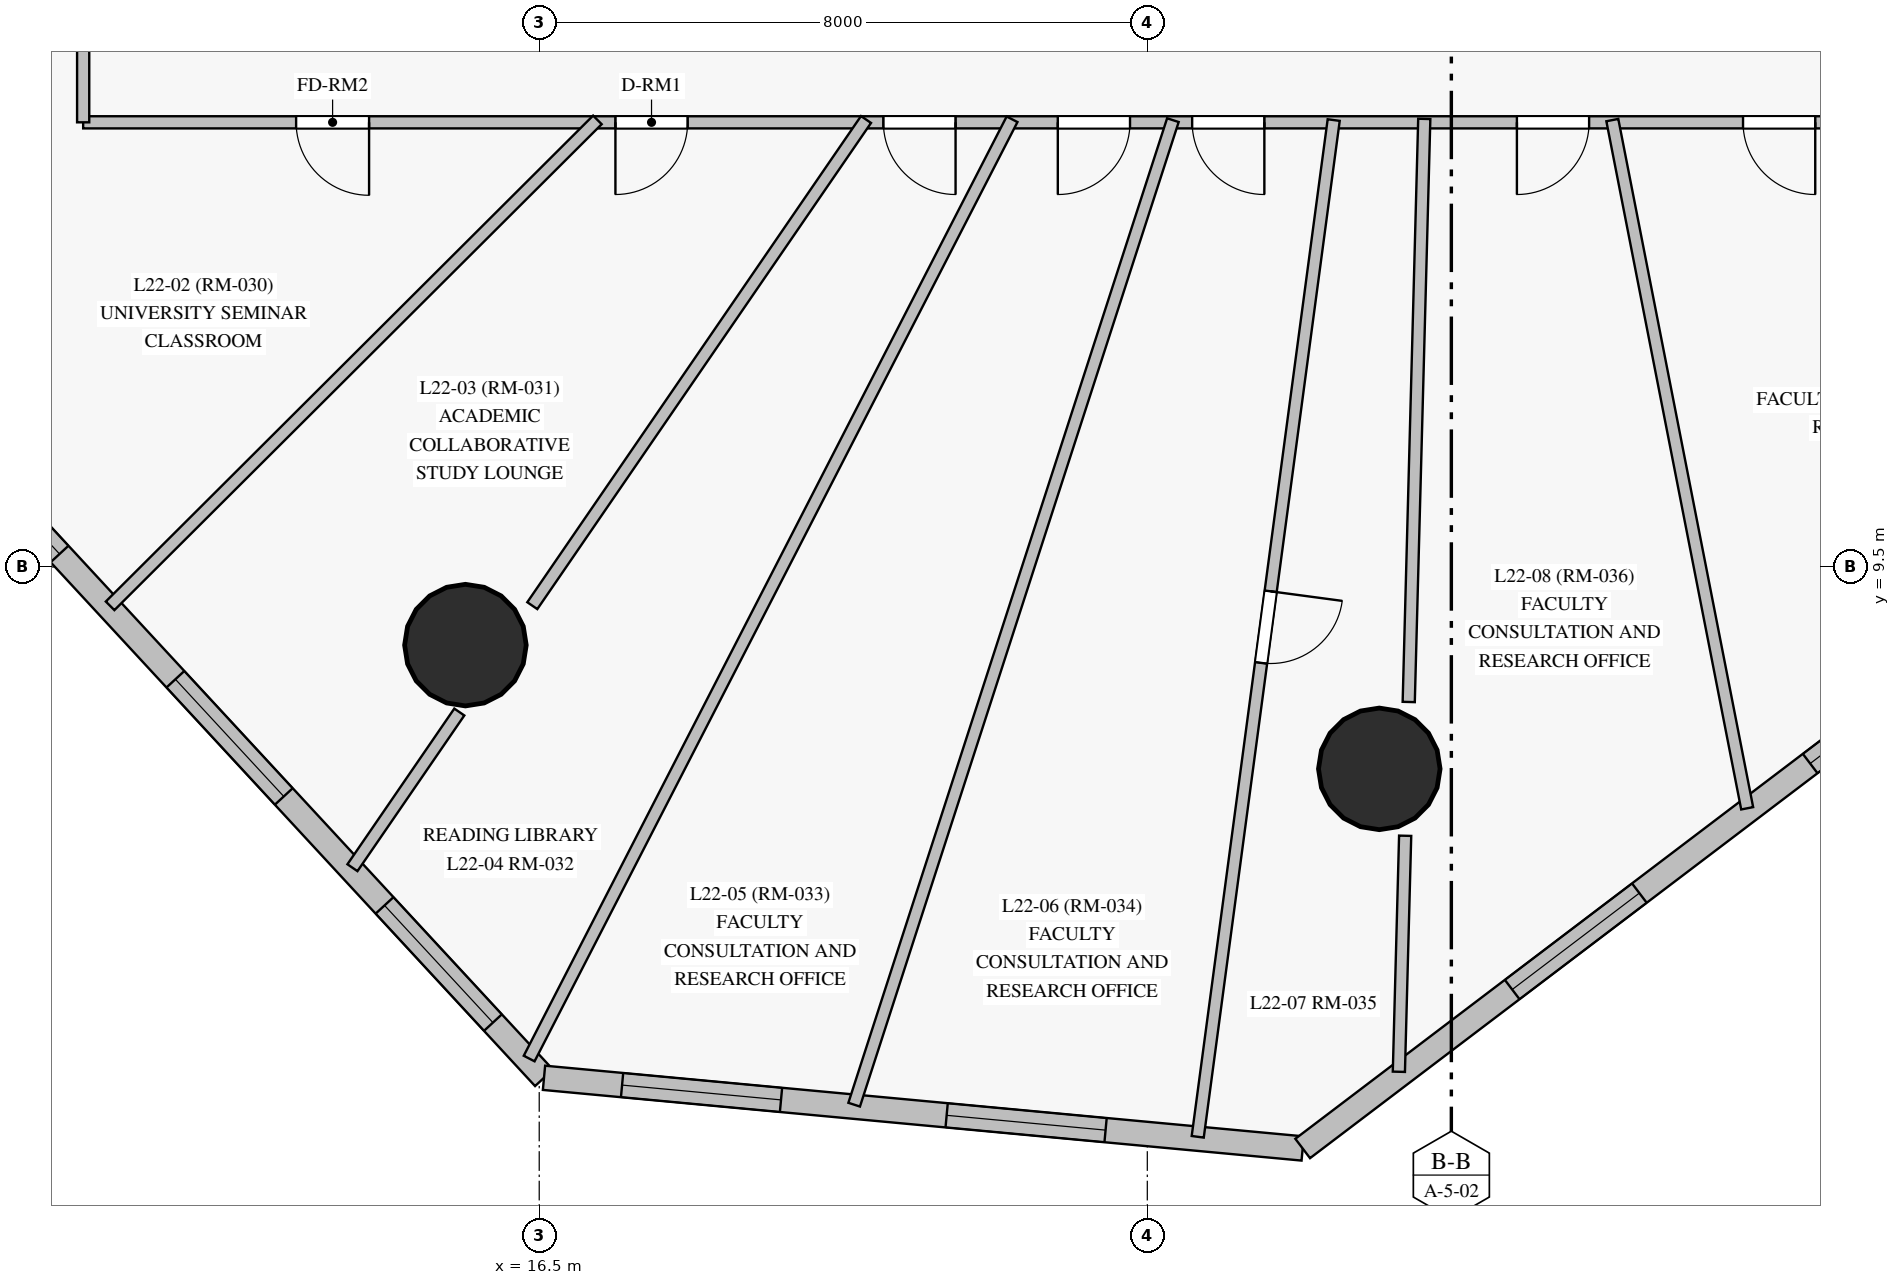
"""IFC4 building model, lengths in metres.
Left out: names, types, materials, properties, quantities, classifications, styles, units other than length and angle.
Written with IfcOpenShell. Run it as: python <this file> out.ifc"""

import sys

from ifc_helpers import new_model, si_unit, direction, frame, frame_2d, origin, origin_with_axes, origin_2d, place, context, subcontext, project, spatial, rectangle, circle, extrude, source, transform, mapped, element, fill, save


model = new_model("IFC4")
c1 = context("Model", 3, precision=1e-05, world=origin(), true_north=direction((0.0, 1.0)))
c2 = subcontext(c1, "Body", "Model", "MODEL_VIEW")
j1 = project(units=[si_unit("LENGTHUNIT", "METRE"), si_unit("PLANEANGLEUNIT", "RADIAN")], contexts=[c1])
p1 = place(None, origin())
s1 = spatial("IfcSite", under=j1, at=p1, CompositionType="ELEMENT")
p2 = place(p1, origin())
s2 = spatial("IfcBuilding", under=s1, at=p2, CompositionType="ELEMENT")
p3 = place(p2, frame((0.0, 0.0, 84.1)))
s3 = spatial("IfcBuildingStorey", under=s2, at=p3, CompositionType="ELEMENT", Elevation=84.1)
m1 = source(origin_with_axes(), c2, "Body", "SweptSolid", [
    extrude(circle(Radius=0.8, at=origin_2d()), origin(), (0.0, 0.0, 1.0), 3.6),
])
for number, where, z_axis, x_axis in (
    (1, (15.529, 8.472, 0.0), (0.0, 0.0, 1.0), (1.0, 0.0, 0.0)),
    (2, (27.552, 6.844, 0.0), (0.0, 0.0, 1.0), (1.0, 0.0, 0.0)),
):
    element("IfcColumn", number, at=place(p3, frame(where, z_axis=z_axis, x_axis=x_axis)), inside=s3, PredefinedType="COLUMN", context=c2, shape_type="MappedRepresentation", body=[
        mapped(m1, transform((0.0, 0.0, 0.0), scale=1.0)),
    ])
p4 = place(p3, frame((8.077, 11.955, 0.0), z_axis=(0.0, 0.0, 1.0), x_axis=(0.678985658744, -0.734151534235, 0.0)))
e3 = element("IfcWall", 3, at=p4, inside=s3, PredefinedType="SOLIDWALL", context=c2, shape_type="SweptSolid", body=[
    extrude(rectangle(XDim=12.498, YDim=0.32, at=frame_2d((6.249, 0.0))), origin(), (0.0, 0.0, 1.0), 3.325),
])
p5 = place(p4, frame((1.011, 0.0, 0.85)))
e4 = element("IfcOpeningElement", 4, at=p5, cuts=e3, PredefinedType="OPENING", context=c2, shape_type="SweptSolid", body=[
    extrude(rectangle(XDim=2.1, YDim=1.95, at=frame_2d((1.05, 0.975))), frame((0.0, 0.17, 0.0), z_axis=(0.0, -1.0, 0.0), x_axis=(1.0, 0.0, 0.0)), (0.0, 0.0, 1.0), 0.34),
])
p6 = place(p4, frame((5.356, 0.0, 0.85)))
e5 = element("IfcOpeningElement", 5, at=p6, cuts=e3, PredefinedType="OPENING", context=c2, shape_type="SweptSolid", body=[
    extrude(rectangle(XDim=2.1, YDim=1.95, at=frame_2d((1.05, 0.975))), frame((0.0, 0.17, 0.0), z_axis=(0.0, -1.0, 0.0), x_axis=(1.0, 0.0, 0.0)), (0.0, 0.0, 1.0), 0.34),
])
p7 = place(p4, frame((9.408, 0.0, 0.85)))
e6 = element("IfcOpeningElement", 6, at=p7, cuts=e3, PredefinedType="OPENING", context=c2, shape_type="SweptSolid", body=[
    extrude(rectangle(XDim=2.1, YDim=1.95, at=frame_2d((1.05, 0.975))), frame((0.0, 0.17, 0.0), z_axis=(0.0, -1.0, 0.0), x_axis=(1.0, 0.0, 0.0)), (0.0, 0.0, 1.0), 0.34),
])
p8 = place(p3, frame((16.563, 2.78, 0.0), z_axis=(0.0, 0.0, 1.0), x_axis=(0.995692593076, -0.092716018536, 0.0)))
e7 = element("IfcWall", 7, at=p8, inside=s3, PredefinedType="SOLIDWALL", context=c2, shape_type="SweptSolid", body=[
    extrude(rectangle(XDim=10.025, YDim=0.32, at=frame_2d((5.012, 0.0))), origin(), (0.0, 0.0, 1.0), 3.325),
])
p9 = place(p8, frame((1.032, 0.0, 0.85)))
e8 = element("IfcOpeningElement", 8, at=p9, cuts=e7, PredefinedType="OPENING", context=c2, shape_type="SweptSolid", body=[
    extrude(rectangle(XDim=2.1, YDim=1.95, at=frame_2d((1.05, 0.975))), frame((0.0, 0.17, 0.0), z_axis=(0.0, -1.0, 0.0), x_axis=(1.0, 0.0, 0.0)), (0.0, 0.0, 1.0), 0.34),
])
p10 = place(p8, frame((5.32, 0.0, 0.85)))
e9 = element("IfcOpeningElement", 9, at=p10, cuts=e7, PredefinedType="OPENING", context=c2, shape_type="SweptSolid", body=[
    extrude(rectangle(XDim=2.1, YDim=1.95, at=frame_2d((1.05, 0.975))), frame((0.0, 0.17, 0.0), z_axis=(0.0, -1.0, 0.0), x_axis=(1.0, 0.0, 0.0)), (0.0, 0.0, 1.0), 0.34),
])
p11 = place(p3, frame((26.544, 1.85, 0.0), z_axis=(0.0, 0.0, 1.0), x_axis=(0.796740715511, 0.604321298852, 0.0)))
e10 = element("IfcWall", 10, at=p11, inside=s3, PredefinedType="SOLIDWALL", context=c2, shape_type="SweptSolid", body=[
    extrude(rectangle(XDim=15.002, YDim=0.32, at=frame_2d((7.501, 0.0))), origin(), (0.0, 0.0, 1.0), 3.325),
])
p12 = place(p11, frame((3.46, 0.0, 0.85)))
e11 = element("IfcOpeningElement", 11, at=p12, cuts=e10, PredefinedType="OPENING", context=c2, shape_type="SweptSolid", body=[
    extrude(rectangle(XDim=2.1, YDim=1.95, at=frame_2d((1.05, 0.975))), frame((0.0, 0.17, 0.0), z_axis=(0.0, -1.0, 0.0), x_axis=(1.0, 0.0, 0.0)), (0.0, 0.0, 1.0), 0.34),
])
p13 = place(p11, frame((8.38, 0.0, 0.85)))
e12 = element("IfcOpeningElement", 12, at=p13, cuts=e10, PredefinedType="OPENING", context=c2, shape_type="SweptSolid", body=[
    extrude(rectangle(XDim=2.1, YDim=1.95, at=frame_2d((1.05, 0.975))), frame((0.0, 0.17, 0.0), z_axis=(0.0, -1.0, 0.0), x_axis=(1.0, 0.0, 0.0)), (0.0, 0.0, 1.0), 0.34),
])
p14 = place(p11, frame((11.842, 0.0, 0.85)))
e13 = element("IfcOpeningElement", 13, at=p14, cuts=e10, PredefinedType="OPENING", context=c2, shape_type="SweptSolid", body=[
    extrude(rectangle(XDim=2.1, YDim=1.95, at=frame_2d((1.05, 0.975))), frame((0.0, 0.17, 0.0), z_axis=(0.0, -1.0, 0.0), x_axis=(1.0, 0.0, 0.0)), (0.0, 0.0, 1.0), 0.34),
])
p15 = place(p3, frame((40.25, 15.35, 0.0), z_axis=(0.0, 0.0, 1.0), x_axis=(-1.0, 0.0, 0.0)))
e14 = element("IfcWall", 14, at=p15, inside=s3, PredefinedType="PARTITIONING", context=c2, shape_type="SweptSolid", body=[
    extrude(rectangle(XDim=29.75, YDim=0.16, at=frame_2d((14.875, 0.0))), origin(), (0.0, 0.0, 1.0), 2.675),
])
p16 = place(p15, frame((25.988, 0.0, 0.0)))
e15 = element("IfcOpeningElement", 15, at=p16, cuts=e14, PredefinedType="OPENING", context=c2, shape_type="SweptSolid", body=[
    extrude(rectangle(XDim=0.96, YDim=2.15, at=frame_2d((0.48, 1.075))), frame((0.0, 0.09, 0.0), z_axis=(0.0, -1.0, 0.0), x_axis=(1.0, 0.0, 0.0)), (0.0, 0.0, 1.0), 0.18),
])
p17 = place(p15, frame((21.798, 0.0, 0.0)))
e16 = element("IfcOpeningElement", 16, at=p17, cuts=e14, PredefinedType="OPENING", context=c2, shape_type="SweptSolid", body=[
    extrude(rectangle(XDim=0.95, YDim=2.15, at=frame_2d((0.475, 1.075))), frame((0.0, 0.09, 0.0), z_axis=(0.0, -1.0, 0.0), x_axis=(1.0, 0.0, 0.0)), (0.0, 0.0, 1.0), 0.18),
])
p18 = place(p15, frame((18.272, 0.0, 0.0)))
e17 = element("IfcOpeningElement", 17, at=p18, cuts=e14, PredefinedType="OPENING", context=c2, shape_type="SweptSolid", body=[
    extrude(rectangle(XDim=0.95, YDim=2.15, at=frame_2d((0.475, 1.075))), frame((0.0, 0.09, 0.0), z_axis=(0.0, -1.0, 0.0), x_axis=(1.0, 0.0, 0.0)), (0.0, 0.0, 1.0), 0.18),
])
p19 = place(p15, frame((15.977, 0.0, 0.0)))
e18 = element("IfcOpeningElement", 18, at=p19, cuts=e14, PredefinedType="OPENING", context=c2, shape_type="SweptSolid", body=[
    extrude(rectangle(XDim=0.95, YDim=2.15, at=frame_2d((0.475, 1.075))), frame((0.0, 0.09, 0.0), z_axis=(0.0, -1.0, 0.0), x_axis=(1.0, 0.0, 0.0)), (0.0, 0.0, 1.0), 0.18),
])
p20 = place(p15, frame((14.21, 0.0, 0.0)))
e19 = element("IfcOpeningElement", 19, at=p20, cuts=e14, PredefinedType="OPENING", context=c2, shape_type="SweptSolid", body=[
    extrude(rectangle(XDim=0.95, YDim=2.15, at=frame_2d((0.475, 1.075))), frame((0.0, 0.09, 0.0), z_axis=(0.0, -1.0, 0.0), x_axis=(1.0, 0.0, 0.0)), (0.0, 0.0, 1.0), 0.18),
])
p21 = place(p15, frame((9.938, 0.0, 0.0)))
e20 = element("IfcOpeningElement", 20, at=p21, cuts=e14, PredefinedType="OPENING", context=c2, shape_type="SweptSolid", body=[
    extrude(rectangle(XDim=0.95, YDim=2.15, at=frame_2d((0.475, 1.075))), frame((0.0, 0.09, 0.0), z_axis=(0.0, -1.0, 0.0), x_axis=(1.0, 0.0, 0.0)), (0.0, 0.0, 1.0), 0.18),
])
p22 = place(p15, frame((6.962, 0.0, 0.0)))
e21 = element("IfcOpeningElement", 21, at=p22, cuts=e14, PredefinedType="OPENING", context=c2, shape_type="SweptSolid", body=[
    extrude(rectangle(XDim=0.95, YDim=2.15, at=frame_2d((0.475, 1.075))), frame((0.0, 0.09, 0.0), z_axis=(0.0, -1.0, 0.0), x_axis=(1.0, 0.0, 0.0)), (0.0, 0.0, 1.0), 0.18),
])
p23 = place(p3, frame((10.5, 15.35, 0.0), z_axis=(0.0, 0.0, 1.0), x_axis=(0.0, 1.0, 0.0)))
e22 = element("IfcWall", 22, at=p23, inside=s3, PredefinedType="PARTITIONING", context=c2, shape_type="SweptSolid", body=[
    extrude(rectangle(XDim=22.3, YDim=0.16, at=frame_2d((11.15, 0.0))), origin(), (0.0, 0.0, 1.0), 2.725),
])
p24 = place(p23, frame((7.33, 0.0, 0.0)))
e23 = element("IfcOpeningElement", 23, at=p24, cuts=e22, PredefinedType="OPENING", context=c2, shape_type="SweptSolid", body=[
    extrude(rectangle(XDim=0.95, YDim=2.15, at=frame_2d((0.475, 1.075))), frame((0.0, 0.09, 0.0), z_axis=(0.0, -1.0, 0.0), x_axis=(1.0, 0.0, 0.0)), (0.0, 0.0, 1.0), 0.18),
])
p25 = place(p23, frame((11.015, 0.0, 0.0)))
e24 = element("IfcOpeningElement", 24, at=p25, cuts=e22, PredefinedType="OPENING", context=c2, shape_type="SweptSolid", body=[
    extrude(rectangle(XDim=0.95, YDim=2.15, at=frame_2d((0.475, 1.075))), frame((0.0, 0.09, 0.0), z_axis=(0.0, -1.0, 0.0), x_axis=(1.0, 0.0, 0.0)), (0.0, 0.0, 1.0), 0.18),
])
p26 = place(p3, frame((22.721, 15.39, 0.0), z_axis=(0.0, 0.0, 1.0), x_axis=(-0.457243193553, -0.889341701456, 0.0)))
e25 = element("IfcWall", 25, at=p26, inside=s3, PredefinedType="PARTITIONING", context=c2, shape_type="SweptSolid", body=[
    extrude(rectangle(XDim=13.894, YDim=0.16, at=frame_2d((6.947, 0.0))), origin(), (0.0, 0.0, 1.0), 3.325),
])
p27 = place(p3, frame((24.837, 15.378, 0.0), z_axis=(0.0, 0.0, 1.0), x_axis=(-0.308016994019, -0.951380855071, 0.0)))
e26 = element("IfcWall", 26, at=p27, inside=s3, PredefinedType="PARTITIONING", context=c2, shape_type="SweptSolid", body=[
    extrude(rectangle(XDim=13.614, YDim=0.16, at=frame_2d((6.807, 0.0))), origin(), (0.0, 0.0, 1.0), 3.325),
])
p28 = place(p3, frame((26.952, 15.38, 0.0), z_axis=(0.0, 0.0, 1.0), x_axis=(-0.132553577281, -0.99117584169, 0.0)))
e27 = element("IfcWall", 27, at=p28, inside=s3, PredefinedType="PARTITIONING", context=c2, shape_type="SweptSolid", body=[
    extrude(rectangle(XDim=13.495, YDim=0.16, at=frame_2d((6.748, 0.0))), origin(), (0.0, 0.0, 1.0), 2.675),
])
p29 = place(p28, frame((6.255, 0.0, 0.0)))
e28 = element("IfcOpeningElement", 28, at=p29, cuts=e27, PredefinedType="OPENING", context=c2, shape_type="SweptSolid", body=[
    extrude(rectangle(XDim=0.95, YDim=2.15, at=frame_2d((0.475, 1.075))), frame((0.0, 0.09, 0.0), z_axis=(0.0, -1.0, 0.0), x_axis=(1.0, 0.0, 0.0)), (0.0, 0.0, 1.0), 0.18),
])
p30 = place(p3, frame((30.618, 15.379, 0.0), z_axis=(0.0, 0.0, 1.0), x_axis=(0.192298041078, -0.981336569887, 0.0)))
e29 = element("IfcWall", 29, at=p30, inside=s3, PredefinedType="PARTITIONING", context=c2, shape_type="SweptSolid", body=[
    extrude(rectangle(XDim=9.226, YDim=0.16, at=frame_2d((4.613, 0.0))), origin(), (0.0, 0.0, 1.0), 3.325),
])
p31 = place(p3, frame((17.265, 15.382, 0.0), z_axis=(0.0, 0.0, 1.0), x_axis=(-0.708103786382, -0.706108368249, 0.0)))
e30 = element("IfcWall", 30, at=p31, inside=s3, PredefinedType="PARTITIONING", context=c2, shape_type="SweptSolid", body=[
    extrude(rectangle(XDim=9.054, YDim=0.16, at=frame_2d((4.527, 0.0))), origin(), (0.0, 0.0, 1.0), 3.325),
])
p32 = place(p3, frame((20.799, 15.387, 0.0), z_axis=(0.0, 0.0, 1.0), x_axis=(-0.565927650829, -0.824454907213, 0.0)))
e31 = element("IfcWall", 31, at=p32, inside=s3, PredefinedType="PARTITIONING", context=c2, shape_type="SweptSolid", body=[
    extrude(rectangle(XDim=7.758, YDim=0.16, at=frame_2d((3.879, 0.0))), origin(), (0.0, 0.0, 1.0), 2.675),
])
p33 = place(p3, frame((28.144, 15.395, 0.0), z_axis=(0.0, 0.0, 1.0), x_axis=(-0.026661429297, -0.999644520911, 0.0)))
e32 = element("IfcWall", 32, at=p33, inside=s3, PredefinedType="PARTITIONING", context=c2, shape_type="SweptSolid", body=[
    extrude(rectangle(XDim=7.674, YDim=0.16, at=frame_2d((3.837, 0.0))), origin(), (0.0, 0.0, 1.0), 2.675),
])
p34 = place(p3, frame((27.892, 5.964, 0.0), z_axis=(0.0, 0.0, 1.0), x_axis=(-0.026645670312, -0.999644941093, 0.0)))
e33 = element("IfcWall", 33, at=p34, inside=s3, PredefinedType="PARTITIONING", context=c2, shape_type="SweptSolid", body=[
    extrude(rectangle(XDim=3.106, YDim=0.16, at=frame_2d((1.553, 0.0))), origin(), (0.0, 0.0, 1.0), 3.325),
])
p35 = place(p3, frame((15.449, 7.592, 0.0), z_axis=(0.0, 0.0, 1.0), x_axis=(-0.565919777612, -0.824460311542, 0.0)))
e34 = element("IfcWall", 34, at=p35, inside=s3, PredefinedType="PARTITIONING", context=c2, shape_type="SweptSolid", body=[
    extrude(rectangle(XDim=2.484, YDim=0.16, at=frame_2d((1.242, 0.0))), origin(), (0.0, 0.0, 1.0), 3.325),
])
m2 = source(origin_with_axes(), c2, "Body", "SweptSolid", [
    extrude(rectangle(XDim=2.1, YDim=1.95, at=frame_2d((1.05, 0.975))), frame((0.0, 0.03, 0.0), z_axis=(0.0, -1.0, 0.0), x_axis=(1.0, 0.0, 0.0)), (0.0, 0.0, 1.0), 0.06),
])
p36 = place(p5, origin())
e35 = element("IfcWindow", 35, at=p36, inside=s3, PartitioningType="SINGLE_PANEL", PredefinedType="WINDOW", context=c2, shape_type="MappedRepresentation", body=[
    mapped(m2, transform((0.0, 0.0, 0.0), scale=1.0)),
])
fill(e4, e35)
p37 = place(p6, origin())
e36 = element("IfcWindow", 36, at=p37, inside=s3, PartitioningType="SINGLE_PANEL", PredefinedType="WINDOW", context=c2, shape_type="MappedRepresentation", body=[
    mapped(m2, transform((0.0, 0.0, 0.0), scale=1.0)),
])
fill(e5, e36)
p38 = place(p7, origin())
e37 = element("IfcWindow", 37, at=p38, inside=s3, PartitioningType="SINGLE_PANEL", PredefinedType="WINDOW", context=c2, shape_type="MappedRepresentation", body=[
    mapped(m2, transform((0.0, 0.0, 0.0), scale=1.0)),
])
fill(e6, e37)
p39 = place(p9, origin())
e38 = element("IfcWindow", 38, at=p39, inside=s3, PartitioningType="SINGLE_PANEL", PredefinedType="WINDOW", context=c2, shape_type="MappedRepresentation", body=[
    mapped(m2, transform((0.0, 0.0, 0.0), scale=1.0)),
])
fill(e8, e38)
p40 = place(p10, origin())
e39 = element("IfcWindow", 39, at=p40, inside=s3, PartitioningType="SINGLE_PANEL", PredefinedType="WINDOW", context=c2, shape_type="MappedRepresentation", body=[
    mapped(m2, transform((0.0, 0.0, 0.0), scale=1.0)),
])
fill(e9, e39)
p41 = place(p12, origin())
e40 = element("IfcWindow", 40, at=p41, inside=s3, PartitioningType="SINGLE_PANEL", PredefinedType="WINDOW", context=c2, shape_type="MappedRepresentation", body=[
    mapped(m2, transform((0.0, 0.0, 0.0), scale=1.0)),
])
fill(e11, e40)
p42 = place(p13, origin())
e41 = element("IfcWindow", 41, at=p42, inside=s3, PartitioningType="SINGLE_PANEL", PredefinedType="WINDOW", context=c2, shape_type="MappedRepresentation", body=[
    mapped(m2, transform((0.0, 0.0, 0.0), scale=1.0)),
])
fill(e12, e41)
m3 = source(origin_with_axes(), c2, "Body", "SweptSolid", [
    extrude(rectangle(XDim=0.96, YDim=2.15, at=frame_2d((0.48, 1.075))), frame((0.0, 0.025, 0.0), z_axis=(0.0, -1.0, 0.0), x_axis=(1.0, 0.0, 0.0)), (0.0, 0.0, 1.0), 0.05),
])
p43 = place(p16, origin())
e42 = element("IfcDoor", 42, at=p43, inside=s3, OperationType="SINGLE_SWING_LEFT", PredefinedType="DOOR", context=c2, shape_type="MappedRepresentation", body=[
    mapped(m3, transform((0.0, 0.0, 0.0), scale=1.0)),
])
fill(e15, e42)
m4 = source(origin_with_axes(), c2, "Body", "SweptSolid", [
    extrude(rectangle(XDim=0.95, YDim=2.15, at=frame_2d((0.475, 1.075))), frame((0.0, 0.025, 0.0), z_axis=(0.0, -1.0, 0.0), x_axis=(1.0, 0.0, 0.0)), (0.0, 0.0, 1.0), 0.05),
])
p44 = place(p17, origin())
e43 = element("IfcDoor", 43, at=p44, inside=s3, OperationType="SINGLE_SWING_RIGHT", PredefinedType="DOOR", context=c2, shape_type="MappedRepresentation", body=[
    mapped(m4, transform((0.0, 0.0, 0.0), scale=1.0)),
])
fill(e16, e43)
p45 = place(p18, origin())
e44 = element("IfcDoor", 44, at=p45, inside=s3, OperationType="SINGLE_SWING_LEFT", PredefinedType="DOOR", context=c2, shape_type="MappedRepresentation", body=[
    mapped(m4, transform((0.0, 0.0, 0.0), scale=1.0)),
])
fill(e17, e44)
p46 = place(p19, origin())
e45 = element("IfcDoor", 45, at=p46, inside=s3, OperationType="SINGLE_SWING_RIGHT", PredefinedType="DOOR", context=c2, shape_type="MappedRepresentation", body=[
    mapped(m4, transform((0.0, 0.0, 0.0), scale=1.0)),
])
fill(e18, e45)
p47 = place(p20, origin())
e46 = element("IfcDoor", 46, at=p47, inside=s3, OperationType="SINGLE_SWING_LEFT", PredefinedType="DOOR", context=c2, shape_type="MappedRepresentation", body=[
    mapped(m4, transform((0.0, 0.0, 0.0), scale=1.0)),
])
fill(e19, e46)
p48 = place(p21, origin())
e47 = element("IfcDoor", 47, at=p48, inside=s3, OperationType="SINGLE_SWING_RIGHT", PredefinedType="DOOR", context=c2, shape_type="MappedRepresentation", body=[
    mapped(m4, transform((0.0, 0.0, 0.0), scale=1.0)),
])
fill(e20, e47)
p49 = place(p22, origin())
e48 = element("IfcDoor", 48, at=p49, inside=s3, OperationType="SINGLE_SWING_LEFT", PredefinedType="DOOR", context=c2, shape_type="MappedRepresentation", body=[
    mapped(m4, transform((0.0, 0.0, 0.0), scale=1.0)),
])
fill(e21, e48)
p50 = place(p29, origin())
e49 = element("IfcDoor", 49, at=p50, inside=s3, OperationType="SINGLE_SWING_LEFT", PredefinedType="DOOR", context=c2, shape_type="MappedRepresentation", body=[
    mapped(m4, transform((0.0, 0.0, 0.0), scale=1.0)),
])
fill(e28, e49)
save(model, sys.argv[1])
